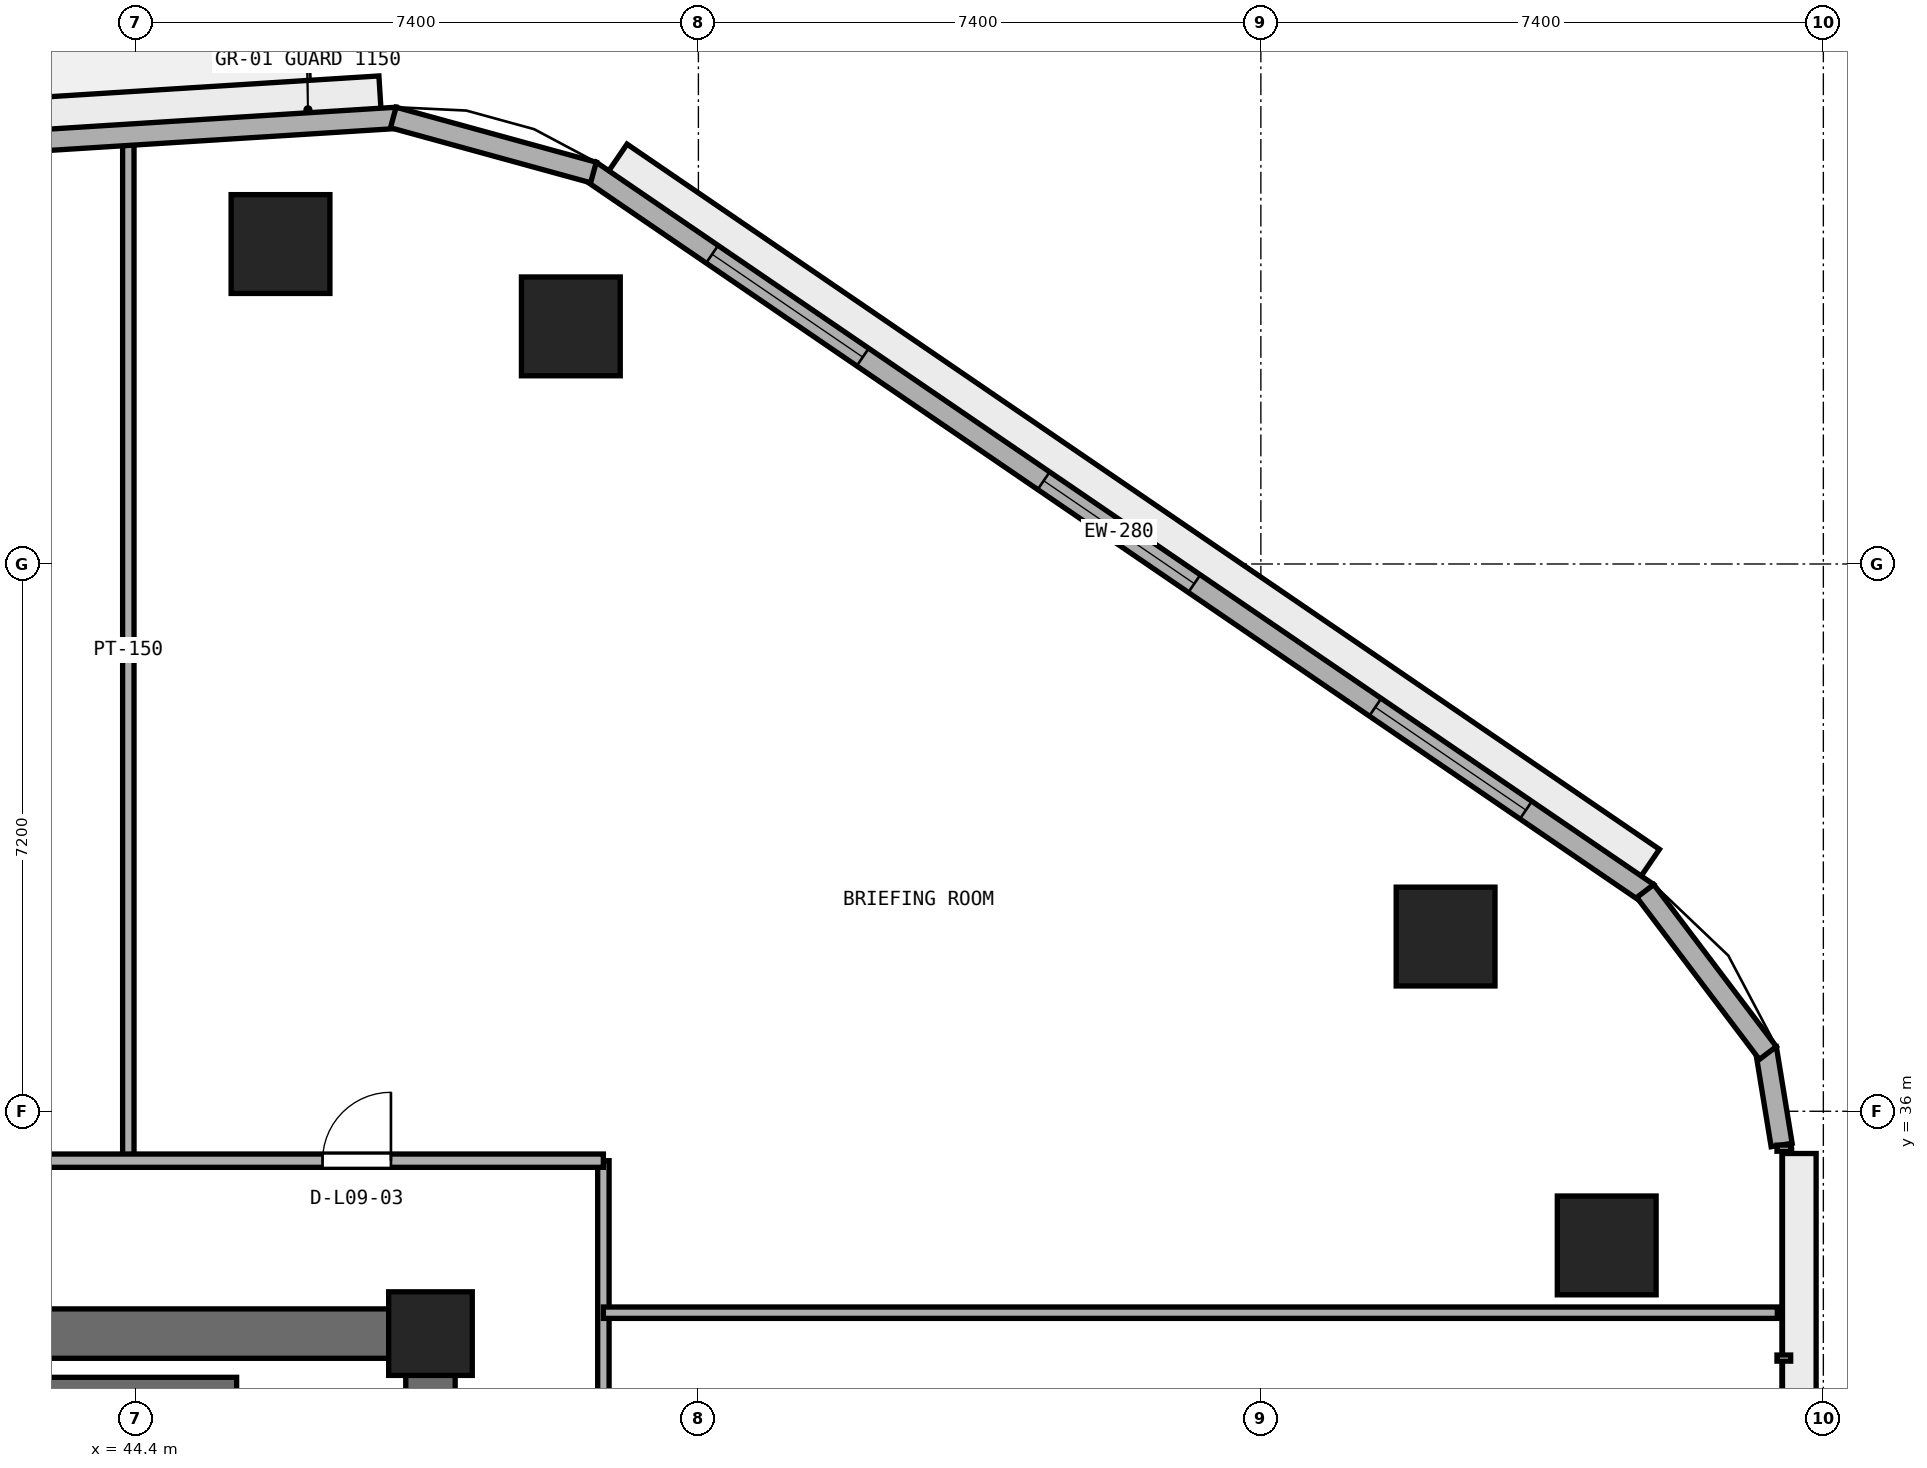
"""IFC4 building model, lengths in metres.
Left out: names, types, materials, properties, quantities, classifications, styles, units other than length and angle.
Written with IfcOpenShell. Run it as: python <this file> out.ifc"""

import sys

from ifc_helpers import new_model, si_unit, direction, frame, frame_2d, origin, origin_2d, place, context, subcontext, project, spatial, rectangle, extrude, element, fill, save


model = new_model("IFC4")
c1 = context("Model", 3, precision=1e-05, world=origin(), true_north=direction((0.0, 1.0)))
c2 = subcontext(c1, "Body", "Model", "MODEL_VIEW")
j1 = project(units=[si_unit("LENGTHUNIT", "METRE"), si_unit("PLANEANGLEUNIT", "RADIAN")], contexts=[c1])
p1 = place(None, origin())
s1 = spatial("IfcSite", under=j1, at=p1, CompositionType="ELEMENT")
p2 = place(p1, origin())
s2 = spatial("IfcBuilding", under=s1, at=p2, CompositionType="ELEMENT")
p3 = place(p2, frame((0.0, 0.0, 40.2)))
s3 = spatial("IfcBuildingStorey", under=s2, at=p3, CompositionType="ELEMENT", Elevation=40.2)
p4 = place(p3, frame((25.4, 33.075, 0.0), z_axis=(0.0, 0.0, 1.0), x_axis=(1.0, 0.0, 0.0)))
e1 = element("IfcWall", 1, at=p4, inside=s3, PredefinedType="SHEAR", context=c2, shape_type="SweptSolid", body=[
    extrude(rectangle(XDim=23.2, YDim=0.65, at=frame_2d((11.6, 0.0))), origin(), (0.0, 0.0, 1.0), 3.525),
])
p5 = place(p3, frame((48.275, 17.65, 0.0), z_axis=(0.0, 0.0, 1.0), x_axis=(0.0, 1.0, 0.0)))
e2 = element("IfcWall", 2, at=p5, inside=s3, PredefinedType="SHEAR", context=c2, shape_type="SweptSolid", body=[
    extrude(rectangle(XDim=15.1, YDim=0.65, at=frame_2d((7.55, 0.0))), origin(), (0.0, 0.0, 1.0), 3.525),
])
p6 = place(p5, frame((5.65, 0.0, 0.0)))
e3 = element("IfcOpeningElement", 3, at=p6, cuts=e2, PredefinedType="OPENING", context=c2, shape_type="SweptSolid", body=[
    extrude(rectangle(XDim=1.5, YDim=2.15, at=frame_2d((0.75, 1.075))), frame((0.0, 0.335, 0.0), z_axis=(0.0, -1.0, 0.0), x_axis=(1.0, 0.0, 0.0)), (0.0, 0.0, 1.0), 0.67),
])
p7 = place(p3, frame((48.275, 33.075, 0.0), z_axis=(0.0, 0.0, 1.0), x_axis=(1.0, 0.0, 0.0)))
e4 = element("IfcColumn", 4, at=p7, inside=s3, PredefinedType="PILASTER", context=c2, shape_type="SweptSolid", body=[
    extrude(rectangle(XDim=1.1, YDim=1.1, at=origin_2d()), origin(), (0.0, 0.0, 1.0), 3.8),
])
for number, where, z_axis, x_axis in (
    (5, (63.75, 34.235, 0.0), (0.0, 0.0, 1.0), (1.0, 0.0, 0.0)),
    (6, (61.63, 38.299, 0.0), (0.0, 0.0, 1.0), (1.0, 0.0, 0.0)),
    (7, (50.122, 46.326, 0.0), (0.0, 0.0, 1.0), (1.0, 0.0, 0.0)),
    (8, (46.302, 47.409, 0.0), (0.0, 0.0, 1.0), (1.0, 0.0, 0.0)),
):
    element("IfcColumn", number, at=place(p3, frame(where, z_axis=z_axis, x_axis=x_axis)), inside=s3, PredefinedType="COLUMN", context=c2, shape_type="SweptSolid", body=[
        extrude(rectangle(XDim=1.3, YDim=1.3, at=origin_2d()), origin(), (0.0, 0.0, 1.0), 3.8),
    ])
p8 = place(p3, frame((38.425, 32.375, 0.0), z_axis=(0.0, 0.0, 1.0), x_axis=(1.0, 0.0, 0.0)))
e9 = element("IfcWall", 9, at=p8, inside=s3, PredefinedType="SHEAR", context=c2, shape_type="SweptSolid", body=[
    extrude(rectangle(XDim=7.3, YDim=0.25, at=frame_2d((3.65, 0.0))), origin(), (0.0, 0.0, 1.0), 3.525),
])
p9 = place(p3, frame((50.55, 15.05, 0.0), z_axis=(0.0, 0.0, 1.0), x_axis=(0.0, 1.0, 0.0)))
e10 = element("IfcWall", 10, at=p9, inside=s3, PredefinedType="PARTITIONING", context=c2, shape_type="SweptSolid", body=[
    extrude(rectangle(XDim=20.3, YDim=0.15, at=frame_2d((10.15, 0.0))), origin(), (0.0, 0.0, 1.0), 3.525),
])
p10 = place(p9, frame((9.7, 0.0, 0.0)))
e11 = element("IfcOpeningElement", 11, at=p10, cuts=e10, PredefinedType="OPENING", context=c2, shape_type="SweptSolid", body=[
    extrude(rectangle(XDim=0.9, YDim=2.1, at=frame_2d((0.45, 1.05))), frame((0.0, 0.085, 0.0), z_axis=(0.0, -1.0, 0.0), x_axis=(1.0, 0.0, 0.0)), (0.0, 0.0, 1.0), 0.17),
])
p11 = place(p3, frame((44.3, 35.35, 0.0), z_axis=(0.0, 0.0, 1.0), x_axis=(0.0, 1.0, 0.0)))
e12 = element("IfcWall", 12, at=p11, inside=s3, PredefinedType="PARTITIONING", context=c2, shape_type="SweptSolid", body=[
    extrude(rectangle(XDim=13.432, YDim=0.15, at=frame_2d((6.716, 0.0))), origin(), (0.0, 0.0, 1.0), 3.525),
])
p12 = place(p3, frame((50.55, 33.35, 0.0), z_axis=(0.0, 0.0, 1.0), x_axis=(1.0, 0.0, 0.0)))
e13 = element("IfcWall", 13, at=p12, inside=s3, PredefinedType="PARTITIONING", context=c2, shape_type="SweptSolid", body=[
    extrude(rectangle(XDim=15.445, YDim=0.15, at=frame_2d((7.723, 0.0))), origin(), (0.0, 0.0, 1.0), 2.908),
])
p13 = place(p3, frame((23.45, 35.35, 0.0), z_axis=(0.0, 0.0, 1.0), x_axis=(1.0, 0.0, 0.0)))
e14 = element("IfcWall", 14, at=p13, inside=s3, PredefinedType="PARTITIONING", context=c2, shape_type="SweptSolid", body=[
    extrude(rectangle(XDim=27.1, YDim=0.175, at=frame_2d((13.55, 0.0))), origin(), (0.0, 0.0, 1.0), 3.525),
])
p14 = place(p13, frame((4.295, 0.0, 0.0)))
e15 = element("IfcOpeningElement", 15, at=p14, cuts=e14, PredefinedType="OPENING", context=c2, shape_type="SweptSolid", body=[
    extrude(rectangle(XDim=1.0, YDim=2.12, at=frame_2d((0.5, 1.06))), frame((0.0, 0.097, 0.0), z_axis=(0.0, -1.0, 0.0), x_axis=(1.0, 0.0, 0.0)), (0.0, 0.0, 1.0), 0.195),
])
p15 = place(p13, frame((14.6, 0.0, 0.0)))
e16 = element("IfcOpeningElement", 16, at=p15, cuts=e14, PredefinedType="OPENING", context=c2, shape_type="SweptSolid", body=[
    extrude(rectangle(XDim=1.0, YDim=2.12, at=frame_2d((0.5, 1.06))), frame((0.0, 0.097, 0.0), z_axis=(0.0, -1.0, 0.0), x_axis=(1.0, 0.0, 0.0)), (0.0, 0.0, 1.0), 0.195),
])
p16 = place(p13, frame((23.405, 0.0, 0.0)))
e17 = element("IfcOpeningElement", 17, at=p16, cuts=e14, PredefinedType="OPENING", context=c2, shape_type="SweptSolid", body=[
    extrude(rectangle(XDim=0.9, YDim=2.1, at=frame_2d((0.45, 1.05))), frame((0.0, 0.097, 0.0), z_axis=(0.0, -1.0, 0.0), x_axis=(1.0, 0.0, 0.0)), (0.0, 0.0, 1.0), 0.195),
])
p17 = place(p3, frame((64.29, 38.867, 0.0), z_axis=(0.0, 0.0, 1.0), x_axis=(-0.825755550159, 0.564028165416, 0.0)))
e18 = element("IfcWall", 18, at=p17, inside=s3, PredefinedType="STANDARD", context=c2, shape_type="SweptSolid", body=[
    extrude(rectangle(XDim=16.848, YDim=0.28, at=frame_2d((8.424, 0.0))), origin(), (0.0, 0.0, 1.0), 3.525),
])
p18 = place(p17, frame((1.941, 0.0, 0.9)))
e19 = element("IfcOpeningElement", 19, at=p18, cuts=e18, PredefinedType="OPENING", context=c2, shape_type="SweptSolid", body=[
    extrude(rectangle(XDim=2.4, YDim=1.75, at=frame_2d((1.2, 0.875))), frame((0.0, 0.15, 0.0), z_axis=(0.0, -1.0, 0.0), x_axis=(1.0, 0.0, 0.0)), (0.0, 0.0, 1.0), 0.3),
])
p19 = place(p17, frame((7.224, 0.0, 0.9)))
e20 = element("IfcOpeningElement", 20, at=p19, cuts=e18, PredefinedType="OPENING", context=c2, shape_type="SweptSolid", body=[
    extrude(rectangle(XDim=2.4, YDim=1.75, at=frame_2d((1.2, 0.875))), frame((0.0, 0.15, 0.0), z_axis=(0.0, -1.0, 0.0), x_axis=(1.0, 0.0, 0.0)), (0.0, 0.0, 1.0), 0.3),
])
p20 = place(p17, frame((12.507, 0.0, 0.9)))
e21 = element("IfcOpeningElement", 21, at=p20, cuts=e18, PredefinedType="OPENING", context=c2, shape_type="SweptSolid", body=[
    extrude(rectangle(XDim=2.4, YDim=1.75, at=frame_2d((1.2, 0.875))), frame((0.0, 0.15, 0.0), z_axis=(0.0, -1.0, 0.0), x_axis=(1.0, 0.0, 0.0)), (0.0, 0.0, 1.0), 0.3),
])
p21 = place(p3, frame((47.832, 49.069, 0.0), z_axis=(0.0, 0.0, 1.0), x_axis=(-0.998017725054, -0.062933460723, 0.0)))
e22 = element("IfcWall", 22, at=p21, inside=s3, PredefinedType="STANDARD", context=c2, shape_type="SweptSolid", body=[
    extrude(rectangle(XDim=19.629, YDim=0.28, at=frame_2d((9.815, 0.0))), origin(), (0.0, 0.0, 1.0), 3.525),
])
p22 = place(p21, frame((9.265, 0.0, 0.0)))
e23 = element("IfcOpeningElement", 23, at=p22, cuts=e22, PredefinedType="OPENING", context=c2, shape_type="SweptSolid", body=[
    extrude(rectangle(XDim=1.1, YDim=2.2, at=frame_2d((0.55, 1.1))), frame((0.0, 0.15, 0.0), z_axis=(0.0, -1.0, 0.0), x_axis=(1.0, 0.0, 0.0)), (0.0, 0.0, 1.0), 0.3),
])
p23 = place(p21, frame((15.604, 0.0, 0.9)))
e24 = element("IfcOpeningElement", 24, at=p23, cuts=e22, PredefinedType="OPENING", context=c2, shape_type="SweptSolid", body=[
    extrude(rectangle(XDim=2.4, YDim=1.75, at=frame_2d((1.2, 0.875))), frame((0.0, 0.15, 0.0), z_axis=(0.0, -1.0, 0.0), x_axis=(1.0, 0.0, 0.0)), (0.0, 0.0, 1.0), 0.3),
])
p24 = place(p3, frame((66.052, 35.556, 0.0), z_axis=(0.0, 0.0, 1.0), x_axis=(-0.161357776207, 0.98689597631, 0.0)))
e25 = element("IfcWall", 25, at=p24, inside=s3, PredefinedType="STANDARD", context=c2, shape_type="SweptSolid", body=[
    extrude(rectangle(XDim=1.289, YDim=0.28, at=frame_2d((0.645, 0.0))), origin(), (0.0, 0.0, 1.0), 3.525),
])
p25 = place(p3, frame((65.87, 36.767, 0.0), z_axis=(0.0, 0.0, 1.0), x_axis=(-0.603370463754, 0.797461023166, 0.0)))
e26 = element("IfcWall", 26, at=p25, inside=s3, PredefinedType="STANDARD", context=c2, shape_type="SweptSolid", body=[
    extrude(rectangle(XDim=2.673, YDim=0.28, at=frame_2d((1.336, 0.0))), origin(), (0.0, 0.0, 1.0), 3.525),
])
p26 = place(p3, frame((50.419, 48.351, 0.0), z_axis=(0.0, 0.0, 1.0), x_axis=(-0.964254516967, 0.264977784933, 0.0)))
e27 = element("IfcWall", 27, at=p26, inside=s3, PredefinedType="STANDARD", context=c2, shape_type="SweptSolid", body=[
    extrude(rectangle(XDim=2.731, YDim=0.28, at=frame_2d((1.365, 0.0))), origin(), (0.0, 0.0, 1.0), 3.525),
])
p27 = place(p16, origin())
e28 = element("IfcDoor", 28, at=p27, inside=s3, OperationType="SINGLE_SWING_RIGHT", PredefinedType="DOOR", context=c2, shape_type="SweptSolid", body=[
    extrude(rectangle(XDim=0.9, YDim=2.1, at=frame_2d((0.45, 1.05))), frame((0.0, 0.025, 0.0), z_axis=(0.0, -1.0, 0.0), x_axis=(1.0, 0.0, 0.0)), (0.0, 0.0, 1.0), 0.05),
])
fill(e17, e28)
p28 = place(p18, origin())
e29 = element("IfcWindow", 29, at=p28, inside=s3, PartitioningType="SINGLE_PANEL", PredefinedType="WINDOW", context=c2, shape_type="SweptSolid", body=[
    extrude(rectangle(XDim=2.4, YDim=1.75, at=frame_2d((1.2, 0.875))), frame((0.0, 0.03, 0.0), z_axis=(0.0, -1.0, 0.0), x_axis=(1.0, 0.0, 0.0)), (0.0, 0.0, 1.0), 0.06),
])
fill(e19, e29)
p29 = place(p19, origin())
e30 = element("IfcWindow", 30, at=p29, inside=s3, PartitioningType="SINGLE_PANEL", PredefinedType="WINDOW", context=c2, shape_type="SweptSolid", body=[
    extrude(rectangle(XDim=2.4, YDim=1.75, at=frame_2d((1.2, 0.875))), frame((0.0, 0.03, 0.0), z_axis=(0.0, -1.0, 0.0), x_axis=(1.0, 0.0, 0.0)), (0.0, 0.0, 1.0), 0.06),
])
fill(e20, e30)
p30 = place(p20, origin())
e31 = element("IfcWindow", 31, at=p30, inside=s3, PartitioningType="SINGLE_PANEL", PredefinedType="WINDOW", context=c2, shape_type="SweptSolid", body=[
    extrude(rectangle(XDim=2.4, YDim=1.75, at=frame_2d((1.2, 0.875))), frame((0.0, 0.03, 0.0), z_axis=(0.0, -1.0, 0.0), x_axis=(1.0, 0.0, 0.0)), (0.0, 0.0, 1.0), 0.06),
])
fill(e21, e31)
save(model, sys.argv[1])
